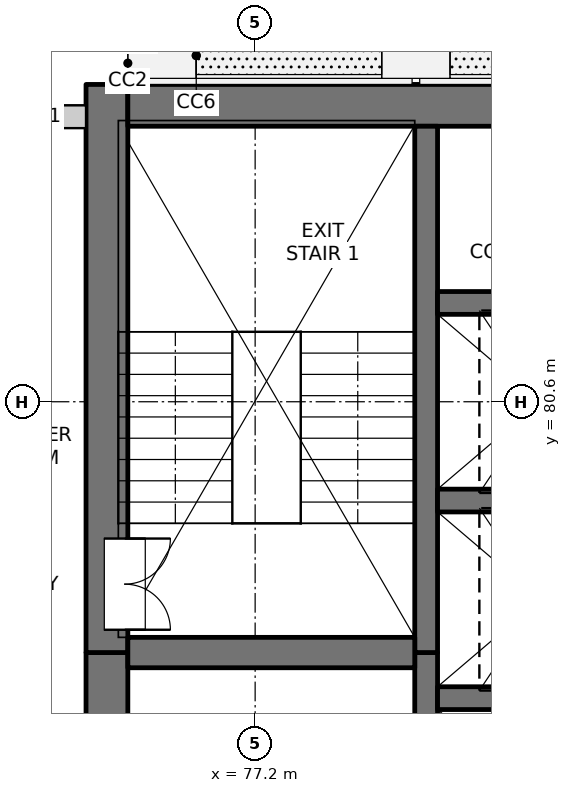
"""IFC4 building model, lengths in metres.
Left out: names, types, materials, properties, quantities, classifications, styles, units other than length and angle.
Written with IfcOpenShell. Run it as: python <this file> out.ifc"""

import sys

from ifc_helpers import new_model, si_unit, direction, frame, frame_2d, origin, place, context, subcontext, project, spatial, rectangle, extrude, element, fill, save


model = new_model("IFC4")
c1 = context("Model", 3, precision=1e-05, world=origin(), true_north=direction((0.0, 1.0)))
c2 = subcontext(c1, "Body", "Model", "MODEL_VIEW")
j1 = project(units=[si_unit("LENGTHUNIT", "METRE"), si_unit("PLANEANGLEUNIT", "RADIAN")], contexts=[c1])
p1 = place(None, origin())
s1 = spatial("IfcSite", under=j1, at=p1, CompositionType="ELEMENT")
p2 = place(p1, origin())
s2 = spatial("IfcBuilding", under=s1, at=p2, CompositionType="ELEMENT")
p3 = place(p2, frame((0.0, 0.0, 103.3)))
s3 = spatial("IfcBuildingStorey", under=s2, at=p3, CompositionType="ELEMENT", Elevation=103.3)
p4 = place(p3, frame((75.25, 54.975, -0.25), z_axis=(0.0, 0.0, 1.0), x_axis=(0.0, 1.0, 0.0)))
e1 = element("IfcWall", 1, at=p4, inside=s3, PredefinedType="SOLIDWALL", context=c2, shape_type="SweptSolid", body=[
    extrude(rectangle(XDim=22.325, YDim=0.55, at=frame_2d((11.163, 0.0))), origin(), (0.0, 0.0, 1.0), 3.4),
])
p5 = place(p4, frame((7.475, 0.0, 0.25)))
e2 = element("IfcOpeningElement", 2, at=p5, cuts=e1, PredefinedType="OPENING", context=c2, shape_type="SweptSolid", body=[
    extrude(rectangle(XDim=0.9, YDim=2.1, at=frame_2d((0.45, 1.05))), frame((0.0, 0.285, 0.0), z_axis=(0.0, -1.0, 0.0), x_axis=(1.0, 0.0, 0.0)), (0.0, 0.0, 1.0), 0.57),
])
p6 = place(p4, frame((10.775, 0.0, 0.25)))
e3 = element("IfcOpeningElement", 3, at=p6, cuts=e1, PredefinedType="OPENING", context=c2, shape_type="SweptSolid", body=[
    extrude(rectangle(XDim=0.9, YDim=2.1, at=frame_2d((0.45, 1.05))), frame((0.0, 0.285, 0.0), z_axis=(0.0, -1.0, 0.0), x_axis=(1.0, 0.0, 0.0)), (0.0, 0.0, 1.0), 0.57),
])
p7 = place(p4, frame((13.775, 0.0, 0.25)))
e4 = element("IfcOpeningElement", 4, at=p7, cuts=e1, PredefinedType="OPENING", context=c2, shape_type="SweptSolid", body=[
    extrude(rectangle(XDim=0.9, YDim=2.1, at=frame_2d((0.45, 1.05))), frame((0.0, 0.285, 0.0), z_axis=(0.0, -1.0, 0.0), x_axis=(1.0, 0.0, 0.0)), (0.0, 0.0, 1.0), 0.57),
])
p8 = place(p4, frame((16.775, 0.0, 0.25)))
e5 = element("IfcOpeningElement", 5, at=p8, cuts=e1, PredefinedType="OPENING", context=c2, shape_type="SweptSolid", body=[
    extrude(rectangle(XDim=0.9, YDim=2.1, at=frame_2d((0.45, 1.05))), frame((0.0, 0.285, 0.0), z_axis=(0.0, -1.0, 0.0), x_axis=(1.0, 0.0, 0.0)), (0.0, 0.0, 1.0), 0.57),
])
p9 = place(p4, frame((20.075, 0.0, 0.25)))
e6 = element("IfcOpeningElement", 6, at=p9, cuts=e1, PredefinedType="OPENING", context=c2, shape_type="SweptSolid", body=[
    extrude(rectangle(XDim=0.9, YDim=2.1, at=frame_2d((0.45, 1.05))), frame((0.0, 0.285, 0.0), z_axis=(0.0, -1.0, 0.0), x_axis=(1.0, 0.0, 0.0)), (0.0, 0.0, 1.0), 0.57),
])
p10 = place(p3, frame((75.25, 77.3, -0.25), z_axis=(0.0, 0.0, 1.0), x_axis=(0.0, 1.0, 0.0)))
e7 = element("IfcWall", 7, at=p10, inside=s3, PredefinedType="SOLIDWALL", context=c2, shape_type="SweptSolid", body=[
    extrude(rectangle(XDim=7.475, YDim=0.55, at=frame_2d((3.737, 0.0))), origin(), (0.0, 0.0, 1.0), 3.4),
])
p11 = place(p10, frame((0.3, 0.0, 0.25)))
e8 = element("IfcOpeningElement", 8, at=p11, cuts=e7, PredefinedType="OPENING", context=c2, shape_type="SweptSolid", body=[
    extrude(rectangle(XDim=1.2, YDim=2.1, at=frame_2d((0.6, 1.05))), frame((0.0, 0.285, 0.0), z_axis=(0.0, -1.0, 0.0), x_axis=(1.0, 0.0, 0.0)), (0.0, 0.0, 1.0), 0.57),
])
p12 = place(p3, frame((75.525, 84.5, -0.25), z_axis=(0.0, 0.0, 1.0), x_axis=(1.0, 0.0, 0.0)))
e9 = element("IfcWall", 9, at=p12, inside=s3, PredefinedType="SOLIDWALL", context=c2, shape_type="SweptSolid", body=[
    extrude(rectangle(XDim=18.95, YDim=0.55, at=frame_2d((9.475, 0.0))), origin(), (0.0, 0.0, 1.0), 3.4),
])
p13 = place(p3, frame((79.45, 60.95, -0.25), z_axis=(0.0, 0.0, 1.0), x_axis=(0.0, 1.0, 0.0)))
e10 = element("IfcWall", 10, at=p13, inside=s3, PredefinedType="SOLIDWALL", context=c2, shape_type="SweptSolid", body=[
    extrude(rectangle(XDim=16.35, YDim=0.3, at=frame_2d((8.175, 0.0))), origin(), (0.0, 0.0, 1.0), 3.4),
])
p14 = place(p3, frame((79.45, 77.3, -0.25), z_axis=(0.0, 0.0, 1.0), x_axis=(0.0, 1.0, 0.0)))
e11 = element("IfcWall", 11, at=p14, inside=s3, PredefinedType="SOLIDWALL", context=c2, shape_type="SweptSolid", body=[
    extrude(rectangle(XDim=6.925, YDim=0.3, at=frame_2d((3.462, 0.0))), origin(), (0.0, 0.0, 1.0), 3.4),
])
for number, where, z_axis, x_axis in (
    (12, (79.6, 76.7, -0.25), (0.0, 0.0, 1.0), (1.0, 0.0, 0.0)),
    (13, (79.6, 79.3, -0.25), (0.0, 0.0, 1.0), (1.0, 0.0, 0.0)),
    (14, (79.6, 81.9, -0.25), (0.0, 0.0, 1.0), (1.0, 0.0, 0.0)),
):
    element("IfcWall", number, at=place(p3, frame(where, z_axis=z_axis, x_axis=x_axis)), inside=s3, PredefinedType="SOLIDWALL", context=c2, shape_type="SweptSolid", body=[
        extrude(rectangle(XDim=3.0, YDim=0.3, at=frame_2d((1.5, 0.0))), origin(), (0.0, 0.0, 1.0), 3.4),
    ])
p15 = place(p3, frame((75.525, 77.3, -0.25), z_axis=(0.0, 0.0, 1.0), x_axis=(1.0, 0.0, 0.0)))
e15 = element("IfcWall", 15, at=p15, inside=s3, PredefinedType="SOLIDWALL", context=c2, shape_type="SweptSolid", body=[
    extrude(rectangle(XDim=3.775, YDim=0.4, at=frame_2d((1.888, 0.0))), origin(), (0.0, 0.0, 1.0), 3.4),
])
p16 = place(p3, frame((73.725, 84.35, 0.0), z_axis=(0.0, 0.0, 1.0), x_axis=(1.0, 0.0, 0.0)))
e16 = element("IfcWall", 16, at=p16, inside=s3, PredefinedType="SOLIDWALL", context=c2, shape_type="SweptSolid", body=[
    extrude(rectangle(XDim=1.25, YDim=0.3, at=frame_2d((0.625, 0.0))), origin(), (0.0, 0.0, 1.0), 2.7),
])
p17 = place(p11, origin())
e17 = element("IfcDoor", 17, at=p17, inside=s3, OperationType="DOUBLE_DOOR_SINGLE_SWING", PredefinedType="DOOR", context=c2, shape_type="SweptSolid", body=[
    extrude(rectangle(XDim=1.2, YDim=2.1, at=frame_2d((0.6, 1.05))), frame((0.0, -0.21, 0.0), z_axis=(0.0, -1.0, 0.0), x_axis=(1.0, 0.0, 0.0)), (0.0, 0.0, 1.0), 0.05),
])
fill(e8, e17)
save(model, sys.argv[1])
